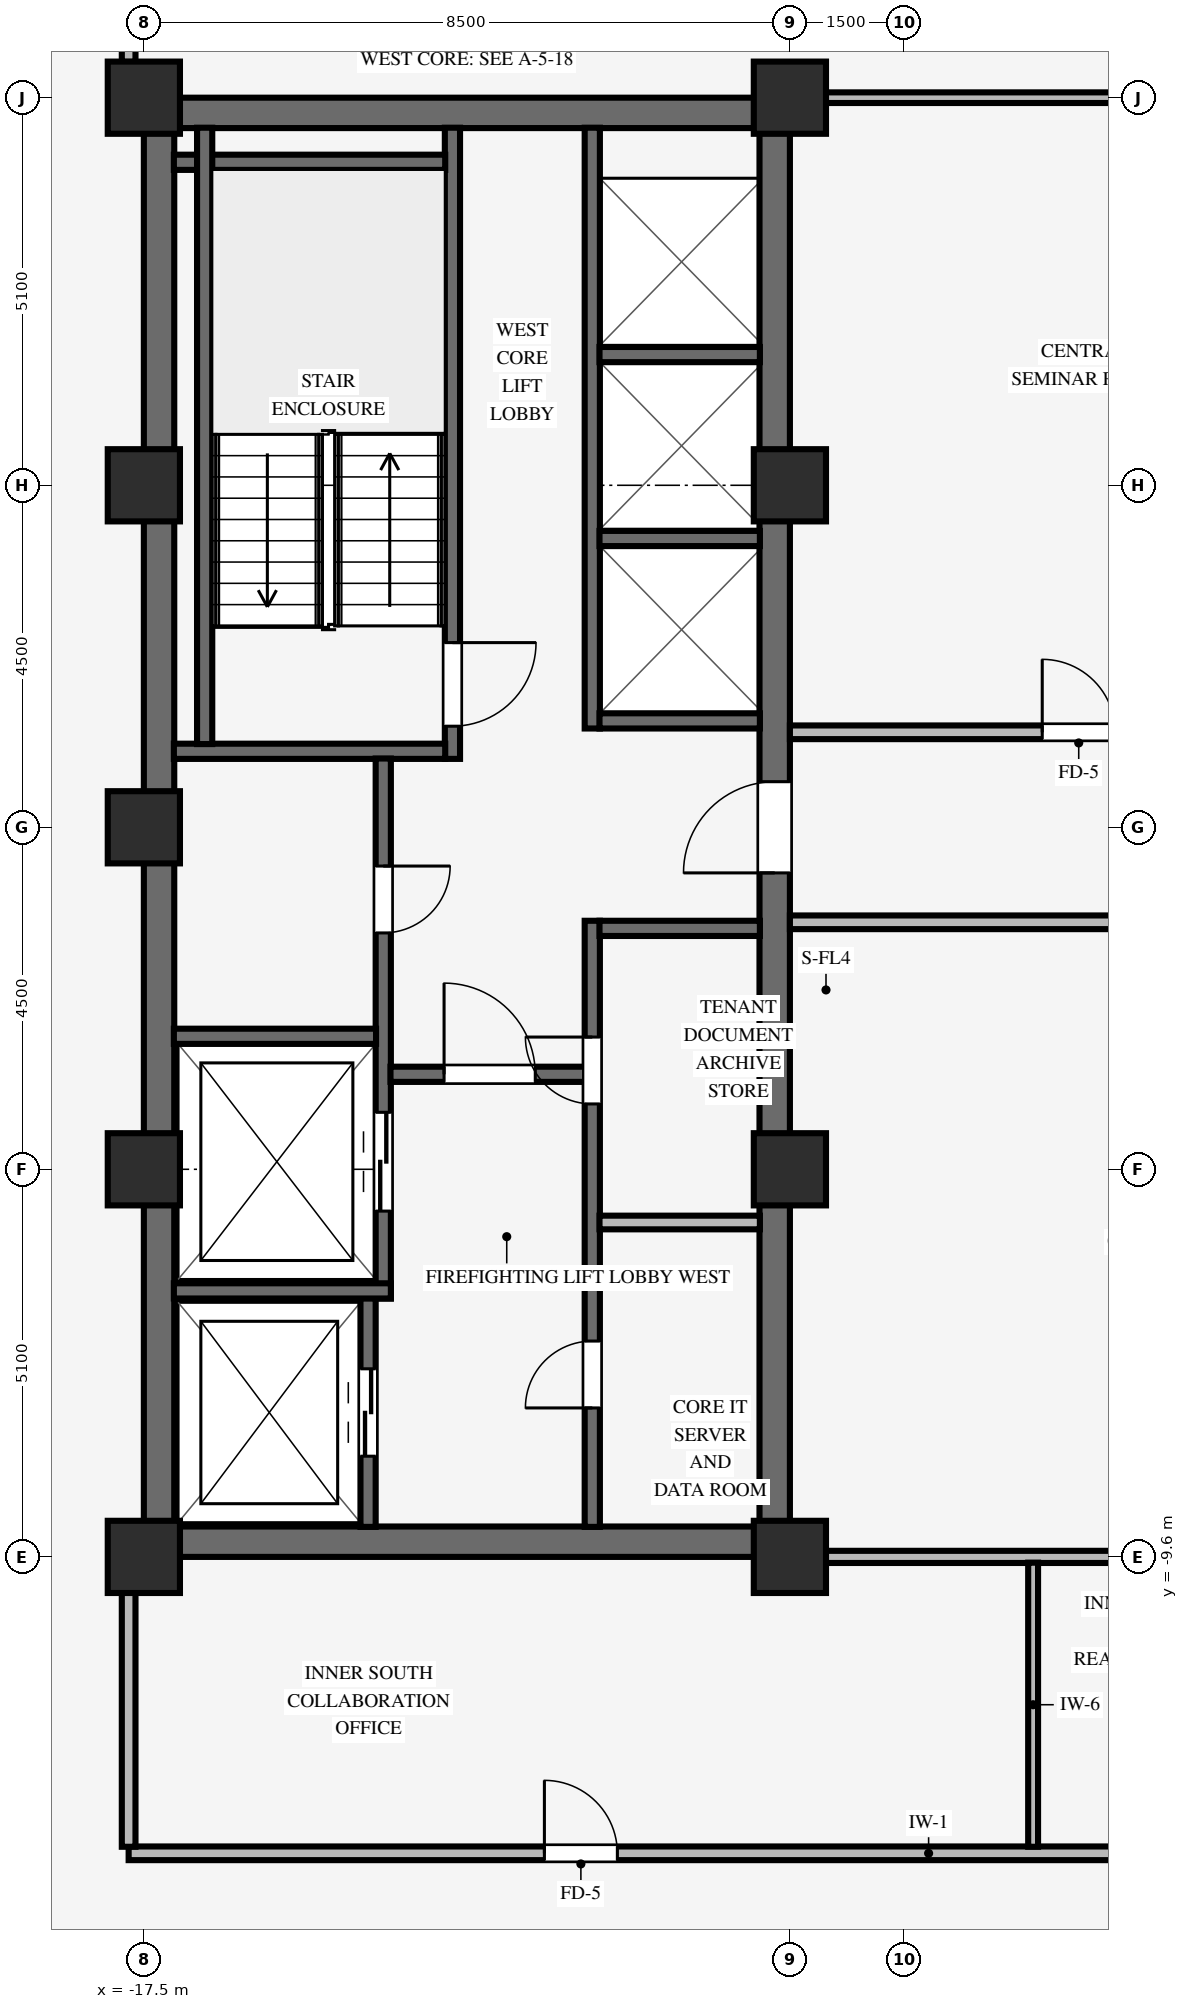
"""IFC4 building model, lengths in metres.
Left out: names, types, materials, properties, quantities, classifications, styles, units other than length and angle.
Written with IfcOpenShell. Run it as: python <this file> out.ifc"""

import sys

from ifc_helpers import new_model, si_unit, direction, frame, frame_2d, origin, origin_2d, place, context, subcontext, project, spatial, rectangle, extrude, source, transform, mapped, element, fill, save


model = new_model("IFC4")
c1 = context("Model", 3, precision=1e-05, world=origin(), true_north=direction((0.0, 1.0)))
c2 = subcontext(c1, "Body", "Model", "MODEL_VIEW")
j1 = project(units=[si_unit("LENGTHUNIT", "METRE"), si_unit("PLANEANGLEUNIT", "RADIAN")], contexts=[c1])
p1 = place(None, origin())
s1 = spatial("IfcSite", under=j1, at=p1, CompositionType="ELEMENT")
p2 = place(p1, origin())
s2 = spatial("IfcBuilding", under=s1, at=p2, CompositionType="ELEMENT")
p3 = place(p2, frame((0.0, 0.0, 182.25)))
s3 = spatial("IfcBuildingStorey", under=s2, at=p3, CompositionType="ELEMENT", Elevation=182.25)
for number, where, z_axis, x_axis in (
    (1, (-17.5, -9.4, 0.0), (0.0, 0.0, 1.0), (1.0, 0.0, 0.0)),
    (2, (-17.5, 9.4, 0.0), (0.0, 0.0, 1.0), (1.0, 0.0, 0.0)),
):
    element("IfcWall", number, at=place(p3, frame(where, z_axis=z_axis, x_axis=x_axis)), inside=s3, PredefinedType="SHEAR", context=c2, shape_type="SweptSolid", body=[
        extrude(rectangle(XDim=8.5, YDim=0.4, at=frame_2d((4.25, 0.0))), origin(), (0.0, 0.0, 1.0), 3.25),
    ])
p4 = place(p3, frame((-17.3, -9.205, 0.0), z_axis=(0.0, 0.0, 1.0), x_axis=(0.0, 1.0, 0.0)))
e3 = element("IfcWall", 3, at=p4, inside=s3, PredefinedType="SHEAR", context=c2, shape_type="SweptSolid", body=[
    extrude(rectangle(XDim=18.41, YDim=0.4, at=frame_2d((9.205, 0.0))), origin(), (0.0, 0.0, 1.0), 3.25),
])
p5 = place(p3, frame((-9.2, -9.205, 0.0), z_axis=(0.0, 0.0, 1.0), x_axis=(0.0, 1.0, 0.0)))
e4 = element("IfcWall", 4, at=p5, inside=s3, PredefinedType="SHEAR", context=c2, shape_type="SweptSolid", body=[
    extrude(rectangle(XDim=18.41, YDim=0.4, at=frame_2d((9.205, 0.0))), origin(), (0.0, 0.0, 1.0), 3.25),
])
p6 = place(p5, frame((8.605, 0.0, 0.0)))
e5 = element("IfcOpeningElement", 5, at=p6, cuts=e4, PredefinedType="OPENING", context=c2, shape_type="SweptSolid", body=[
    extrude(rectangle(XDim=1.2, YDim=2.15, at=frame_2d((0.6, 1.075))), frame((0.0, 0.21, 0.0), z_axis=(0.0, -1.0, 0.0), x_axis=(1.0, 0.0, 0.0)), (0.0, 0.0, 1.0), 0.42),
])
for number, where, z_axis, x_axis in (
    (6, (-17.5, -9.6, 0.0), (0.0, 0.0, 1.0), (1.0, 0.0, 0.0)),
    (7, (-17.5, -4.5, 0.0), (0.0, 0.0, 1.0), (1.0, 0.0, 0.0)),
    (8, (-17.5, 4.5, 0.0), (0.0, 0.0, 1.0), (1.0, 0.0, 0.0)),
    (9, (-17.5, 9.6, 0.0), (0.0, 0.0, 1.0), (1.0, 0.0, 0.0)),
    (10, (-9.0, -9.6, 0.0), (0.0, 0.0, 1.0), (1.0, 0.0, 0.0)),
    (11, (-9.0, -4.5, 0.0), (0.0, 0.0, 1.0), (1.0, 0.0, 0.0)),
    (12, (-9.0, 4.5, 0.0), (0.0, 0.0, 1.0), (1.0, 0.0, 0.0)),
    (13, (-9.0, 9.6, 0.0), (0.0, 0.0, 1.0), (1.0, 0.0, 0.0)),
    (14, (-17.5, 0.0, 0.0), (0.0, 0.0, 1.0), (1.0, 0.0, 0.0)),
):
    element("IfcColumn", number, at=place(p3, frame(where, z_axis=z_axis, x_axis=x_axis)), inside=s3, PredefinedType="COLUMN", context=c2, shape_type="SweptSolid", body=[
        extrude(rectangle(XDim=0.95, YDim=0.95, at=origin_2d()), origin(), (0.0, 0.0, 1.0), 3.25),
    ])
p7 = place(p3, frame((-13.44, 0.9, 0.0), z_axis=(0.0, 0.0, 1.0), x_axis=(0.0, 1.0, 0.0)))
e15 = element("IfcWall", 15, at=p7, inside=s3, PredefinedType="SHEAR", context=c2, shape_type="SweptSolid", body=[
    extrude(rectangle(XDim=8.305, YDim=0.2, at=frame_2d((4.153, 0.0))), origin(), (0.0, 0.0, 1.0), 3.25),
])
p8 = place(p7, frame((1.53, 0.0, 0.0), z_axis=(0.0, 0.0, 1.0), x_axis=(-1.0, 0.0, 0.0)))
e16 = element("IfcOpeningElement", 16, at=p8, cuts=e15, PredefinedType="OPENING", context=c2, shape_type="SweptSolid", body=[
    extrude(rectangle(XDim=1.1, YDim=2.15, at=frame_2d((0.55, 1.075))), frame((0.0, 0.11, 0.0), z_axis=(0.0, -1.0, 0.0), x_axis=(1.0, 0.0, 0.0)), (0.0, 0.0, 1.0), 0.22),
])
for number, where, z_axis, x_axis in (
    (17, (-17.105, 1.0, 0.0), (0.0, 0.0, 1.0), (1.0, 0.0, 0.0)),
    (18, (-17.105, 8.75, 0.0), (0.0, 0.0, 1.0), (1.0, 0.0, 0.0)),
):
    element("IfcWall", number, at=place(p3, frame(where, z_axis=z_axis, x_axis=x_axis)), inside=s3, PredefinedType="SHEAR", context=c2, shape_type="SweptSolid", body=[
        extrude(rectangle(XDim=3.57, YDim=0.2, at=frame_2d((1.785, 0.0))), origin(), (0.0, 0.0, 1.0), 3.25),
    ])
p9 = place(p3, frame((-16.7, 1.095, 0.0), z_axis=(0.0, 0.0, 1.0), x_axis=(0.0, 1.0, 0.0)))
e19 = element("IfcWall", 19, at=p9, inside=s3, PredefinedType="SHEAR", context=c2, shape_type="SweptSolid", body=[
    extrude(rectangle(XDim=8.11, YDim=0.2, at=frame_2d((4.055, 0.0))), origin(), (0.0, 0.0, 1.0), 3.25),
])
p10 = place(p3, frame((-14.55, -9.205, 0.0), z_axis=(0.0, 0.0, 1.0), x_axis=(0.0, 1.0, 0.0)))
e20 = element("IfcWall", 20, at=p10, inside=s3, PredefinedType="SHEAR", context=c2, shape_type="SweptSolid", body=[
    extrude(rectangle(XDim=3.01, YDim=0.2, at=frame_2d((1.505, 0.0))), origin(), (0.0, 0.0, 1.0), 3.25),
])
p11 = place(p10, frame((0.93, 0.0, 0.0)))
e21 = element("IfcOpeningElement", 21, at=p11, cuts=e20, PredefinedType="OPENING", context=c2, shape_type="SweptSolid", body=[
    extrude(rectangle(XDim=1.15, YDim=2.15, at=frame_2d((0.575, 1.075))), frame((0.0, 0.11, 0.0), z_axis=(0.0, -1.0, 0.0), x_axis=(1.0, 0.0, 0.0)), (0.0, 0.0, 1.0), 0.22),
])
p12 = place(p3, frame((-14.35, -6.2, 0.0), z_axis=(0.0, 0.0, 1.0), x_axis=(0.0, 1.0, 0.0)))
e22 = element("IfcWall", 22, at=p12, inside=s3, PredefinedType="SHEAR", context=c2, shape_type="SweptSolid", body=[
    extrude(rectangle(XDim=7.105, YDim=0.2, at=frame_2d((3.552, 0.0))), origin(), (0.0, 0.0, 1.0), 3.25),
])
p13 = place(p12, frame((5.69, 0.0, 0.0), z_axis=(0.0, 0.0, 1.0), x_axis=(-1.0, 0.0, 0.0)))
e23 = element("IfcOpeningElement", 23, at=p13, cuts=e22, PredefinedType="OPENING", context=c2, shape_type="SweptSolid", body=[
    extrude(rectangle(XDim=0.88, YDim=2.1, at=frame_2d((0.44, 1.05))), frame((0.0, 0.11, 0.0), z_axis=(0.0, -1.0, 0.0), x_axis=(1.0, 0.0, 0.0)), (0.0, 0.0, 1.0), 0.22),
])
p14 = place(p12, frame((1.15, 0.0, 0.0)))
e24 = element("IfcOpeningElement", 24, at=p14, cuts=e22, PredefinedType="OPENING", context=c2, shape_type="SweptSolid", body=[
    extrude(rectangle(XDim=1.3, YDim=2.2, at=frame_2d((0.65, 1.1))), frame((0.0, 0.11, 0.0), z_axis=(0.0, -1.0, 0.0), x_axis=(1.0, 0.0, 0.0)), (0.0, 0.0, 1.0), 0.22),
])
p15 = place(p3, frame((-17.105, -6.1, 0.0), z_axis=(0.0, 0.0, 1.0), x_axis=(1.0, 0.0, 0.0)))
e25 = element("IfcWall", 25, at=p15, inside=s3, PredefinedType="SHEAR", context=c2, shape_type="SweptSolid", body=[
    extrude(rectangle(XDim=2.855, YDim=0.2, at=frame_2d((1.427, 0.0))), origin(), (0.0, 0.0, 1.0), 3.25),
])
p16 = place(p3, frame((-17.105, -2.75, 0.0), z_axis=(0.0, 0.0, 1.0), x_axis=(1.0, 0.0, 0.0)))
e26 = element("IfcWall", 26, at=p16, inside=s3, PredefinedType="SHEAR", context=c2, shape_type="SweptSolid", body=[
    extrude(rectangle(XDim=2.66, YDim=0.2, at=frame_2d((1.33, 0.0))), origin(), (0.0, 0.0, 1.0), 3.25),
])
p17 = place(p3, frame((-11.6, -9.205, 0.0), z_axis=(0.0, 0.0, 1.0), x_axis=(0.0, 1.0, 0.0)))
e27 = element("IfcWall", 27, at=p17, inside=s3, PredefinedType="SHEAR", context=c2, shape_type="SweptSolid", body=[
    extrude(rectangle(XDim=7.975, YDim=0.2, at=frame_2d((3.988, 0.0))), origin(), (0.0, 0.0, 1.0), 3.25),
])
p18 = place(p17, frame((1.565, 0.0, 0.0)))
e28 = element("IfcOpeningElement", 28, at=p18, cuts=e27, PredefinedType="OPENING", context=c2, shape_type="SweptSolid", body=[
    extrude(rectangle(XDim=0.88, YDim=2.1, at=frame_2d((0.44, 1.05))), frame((0.0, 0.11, 0.0), z_axis=(0.0, -1.0, 0.0), x_axis=(1.0, 0.0, 0.0)), (0.0, 0.0, 1.0), 0.22),
])
p19 = place(p17, frame((5.565, 0.0, 0.0)))
e29 = element("IfcOpeningElement", 29, at=p19, cuts=e27, PredefinedType="OPENING", context=c2, shape_type="SweptSolid", body=[
    extrude(rectangle(XDim=0.88, YDim=2.1, at=frame_2d((0.44, 1.05))), frame((0.0, 0.11, 0.0), z_axis=(0.0, -1.0, 0.0), x_axis=(1.0, 0.0, 0.0)), (0.0, 0.0, 1.0), 0.22),
])
p20 = place(p3, frame((-14.255, -3.25, 0.0), z_axis=(0.0, 0.0, 1.0), x_axis=(1.0, 0.0, 0.0)))
e30 = element("IfcWall", 30, at=p20, inside=s3, PredefinedType="SHEAR", context=c2, shape_type="SweptSolid", body=[
    extrude(rectangle(XDim=2.56, YDim=0.2, at=frame_2d((1.28, 0.0))), origin(), (0.0, 0.0, 1.0), 3.25),
])
p21 = place(p20, frame((0.705, 0.0, 0.0)))
e31 = element("IfcOpeningElement", 31, at=p21, cuts=e30, PredefinedType="OPENING", context=c2, shape_type="SweptSolid", body=[
    extrude(rectangle(XDim=1.2, YDim=2.15, at=frame_2d((0.6, 1.075))), frame((0.0, 0.11, 0.0), z_axis=(0.0, -1.0, 0.0), x_axis=(1.0, 0.0, 0.0)), (0.0, 0.0, 1.0), 0.22),
])
p22 = place(p3, frame((-11.505, -1.33, 0.0), z_axis=(0.0, 0.0, 1.0), x_axis=(1.0, 0.0, 0.0)))
e32 = element("IfcWall", 32, at=p22, inside=s3, PredefinedType="SHEAR", context=c2, shape_type="SweptSolid", body=[
    extrude(rectangle(XDim=2.11, YDim=0.2, at=frame_2d((1.055, 0.0))), origin(), (0.0, 0.0, 1.0), 3.25),
])
p23 = place(p3, frame((-11.505, -5.2, 0.0), z_axis=(0.0, 0.0, 1.0), x_axis=(1.0, 0.0, 0.0)))
e33 = element("IfcWall", 33, at=p23, inside=s3, PredefinedType="PARTITIONING", context=c2, shape_type="SweptSolid", body=[
    extrude(rectangle(XDim=2.11, YDim=0.18, at=frame_2d((1.055, 0.0))), origin(), (0.0, 0.0, 1.0), 3.24),
])
p24 = place(p3, frame((-11.6, 1.3, 0.0), z_axis=(0.0, 0.0, 1.0), x_axis=(0.0, 1.0, 0.0)))
e34 = element("IfcWall", 34, at=p24, inside=s3, PredefinedType="SHEAR", context=c2, shape_type="SweptSolid", body=[
    extrude(rectangle(XDim=7.905, YDim=0.2, at=frame_2d((3.953, 0.0))), origin(), (0.0, 0.0, 1.0), 3.25),
])
for number, where, z_axis, x_axis in (
    (35, (-11.505, 1.4, 0.0), (0.0, 0.0, 1.0), (1.0, 0.0, 0.0)),
    (36, (-11.505, 3.8, 0.0), (0.0, 0.0, 1.0), (1.0, 0.0, 0.0)),
    (37, (-11.505, 6.22, 0.0), (0.0, 0.0, 1.0), (1.0, 0.0, 0.0)),
):
    element("IfcWall", number, at=place(p3, frame(where, z_axis=z_axis, x_axis=x_axis)), inside=s3, PredefinedType="SHEAR", context=c2, shape_type="SweptSolid", body=[
        extrude(rectangle(XDim=2.11, YDim=0.2, at=frame_2d((1.055, 0.0))), origin(), (0.0, 0.0, 1.0), 3.25),
    ])
p25 = place(p3, frame((-17.7, -13.5, 0.0), z_axis=(0.0, 0.0, 1.0), x_axis=(1.0, 0.0, 0.0)))
e38 = element("IfcWall", 38, at=p25, inside=s3, PredefinedType="PARTITIONING", context=c2, shape_type="SweptSolid", body=[
    extrude(rectangle(XDim=24.3, YDim=0.18, at=frame_2d((12.15, 0.0))), origin(), (0.0, 0.0, 1.0), 2.888),
])
p26 = place(p25, frame((5.47, 0.0, 0.0)))
e39 = element("IfcOpeningElement", 39, at=p26, cuts=e38, PredefinedType="OPENING", context=c2, shape_type="SweptSolid", body=[
    extrude(rectangle(XDim=0.96, YDim=2.1, at=frame_2d((0.48, 1.05))), frame((0.0, 0.1, 0.0), z_axis=(0.0, -1.0, 0.0), x_axis=(1.0, 0.0, 0.0)), (0.0, 0.0, 1.0), 0.2),
])
p27 = place(p25, frame((14.62, 0.0, 0.0)))
e40 = element("IfcOpeningElement", 40, at=p27, cuts=e38, PredefinedType="OPENING", context=c2, shape_type="SweptSolid", body=[
    extrude(rectangle(XDim=0.96, YDim=2.1, at=frame_2d((0.48, 1.05))), frame((0.0, 0.1, 0.0), z_axis=(0.0, -1.0, 0.0), x_axis=(1.0, 0.0, 0.0)), (0.0, 0.0, 1.0), 0.2),
])
p28 = place(p25, frame((18.9, 0.0, 0.0)))
e41 = element("IfcOpeningElement", 41, at=p28, cuts=e38, PredefinedType="OPENING", context=c2, shape_type="SweptSolid", body=[
    extrude(rectangle(XDim=0.9, YDim=2.1, at=frame_2d((0.45, 1.05))), frame((0.0, 0.1, 0.0), z_axis=(0.0, -1.0, 0.0), x_axis=(1.0, 0.0, 0.0)), (0.0, 0.0, 1.0), 0.2),
])
p29 = place(p25, frame((21.0, 0.0, 0.0)))
e42 = element("IfcOpeningElement", 42, at=p29, cuts=e38, PredefinedType="OPENING", context=c2, shape_type="SweptSolid", body=[
    extrude(rectangle(XDim=0.9, YDim=2.1, at=frame_2d((0.45, 1.05))), frame((0.0, 0.1, 0.0), z_axis=(0.0, -1.0, 0.0), x_axis=(1.0, 0.0, 0.0)), (0.0, 0.0, 1.0), 0.2),
])
p30 = place(p3, frame((-8.529, -9.6, 0.0), z_axis=(0.0, 0.0, 1.0), x_axis=(1.0, 0.0, 0.0)))
e43 = element("IfcWall", 43, at=p30, inside=s3, PredefinedType="PARTITIONING", context=c2, shape_type="SweptSolid", body=[
    extrude(rectangle(XDim=8.378, YDim=0.16, at=frame_2d((4.189, 0.0))), origin(), (0.0, 0.0, 1.0), 2.285),
])
p31 = place(p3, frame((-9.0, -1.25, 0.0), z_axis=(0.0, 0.0, 1.0), x_axis=(1.0, 0.0, 0.0)))
e44 = element("IfcWall", 44, at=p31, inside=s3, PredefinedType="PARTITIONING", context=c2, shape_type="SweptSolid", body=[
    extrude(rectangle(XDim=15.6, YDim=0.18, at=frame_2d((7.8, 0.0))), origin(), (0.0, 0.0, 1.0), 3.24),
])
p32 = place(p31, frame((7.32, 0.0, 0.0)))
e45 = element("IfcOpeningElement", 45, at=p32, cuts=e44, PredefinedType="OPENING", context=c2, shape_type="SweptSolid", body=[
    extrude(rectangle(XDim=0.96, YDim=2.1, at=frame_2d((0.48, 1.05))), frame((0.0, 0.1, 0.0), z_axis=(0.0, -1.0, 0.0), x_axis=(1.0, 0.0, 0.0)), (0.0, 0.0, 1.0), 0.2),
])
p33 = place(p3, frame((-9.0, 1.25, 0.0), z_axis=(0.0, 0.0, 1.0), x_axis=(1.0, 0.0, 0.0)))
e46 = element("IfcWall", 46, at=p33, inside=s3, PredefinedType="PARTITIONING", context=c2, shape_type="SweptSolid", body=[
    extrude(rectangle(XDim=15.6, YDim=0.18, at=frame_2d((7.8, 0.0))), origin(), (0.0, 0.0, 1.0), 3.24),
])
p34 = place(p33, frame((3.32, 0.0, 0.0)))
e47 = element("IfcOpeningElement", 47, at=p34, cuts=e46, PredefinedType="OPENING", context=c2, shape_type="SweptSolid", body=[
    extrude(rectangle(XDim=0.96, YDim=2.1, at=frame_2d((0.48, 1.05))), frame((0.0, 0.1, 0.0), z_axis=(0.0, -1.0, 0.0), x_axis=(1.0, 0.0, 0.0)), (0.0, 0.0, 1.0), 0.2),
])
p35 = place(p3, frame((-8.529, 9.6, 0.0), z_axis=(0.0, 0.0, 1.0), x_axis=(1.0, 0.0, 0.0)))
e48 = element("IfcWall", 48, at=p35, inside=s3, PredefinedType="PARTITIONING", context=c2, shape_type="SweptSolid", body=[
    extrude(rectangle(XDim=8.378, YDim=0.14, at=frame_2d((4.189, 0.0))), origin(), (0.0, 0.0, 1.0), 2.285),
])
for number, where, z_axis, x_axis in (
    (49, (-17.7, -13.414, 0.0), (0.0, 0.0, 1.0), (0.0, 1.0, 0.0)),
    (50, (-17.7, 10.071, 0.0), (0.0, 0.0, 1.0), (0.0, 1.0, 0.0)),
):
    element("IfcWall", number, at=place(p3, frame(where, z_axis=z_axis, x_axis=x_axis)), inside=s3, PredefinedType="PARTITIONING", context=c2, shape_type="SweptSolid", body=[
        extrude(rectangle(XDim=3.343, YDim=0.18, at=frame_2d((1.671, 0.0))), origin(), (0.0, 0.0, 1.0), 2.335),
    ])
p36 = place(p3, frame((-5.8, -13.414, 0.0), z_axis=(0.0, 0.0, 1.0), x_axis=(0.0, 1.0, 0.0)))
e51 = element("IfcWall", 51, at=p36, inside=s3, PredefinedType="PARTITIONING", context=c2, shape_type="SweptSolid", body=[
    extrude(rectangle(XDim=3.738, YDim=0.13, at=frame_2d((1.869, 0.0))), origin(), (0.0, 0.0, 1.0), 3.24),
])
m1 = source(origin(), c2, "Body", "SweptSolid", [
    extrude(rectangle(XDim=1.1, YDim=2.15, at=frame_2d((0.55, 1.075))), frame((0.0, 0.025, 0.0), z_axis=(0.0, -1.0, 0.0), x_axis=(1.0, 0.0, 0.0)), (0.0, 0.0, 1.0), 0.05),
])
p37 = place(p8, origin())
e52 = element("IfcDoor", 52, at=p37, inside=s3, OperationType="SINGLE_SWING_LEFT", PredefinedType="DOOR", context=c2, shape_type="MappedRepresentation", body=[
    mapped(m1, transform((0.0, 0.0, 0.0), scale=1.0)),
])
fill(e16, e52)
m2 = source(origin(), c2, "Body", "SweptSolid", [
    extrude(rectangle(XDim=0.88, YDim=2.1, at=frame_2d((0.44, 1.05))), frame((0.0, 0.025, 0.0), z_axis=(0.0, -1.0, 0.0), x_axis=(1.0, 0.0, 0.0)), (0.0, 0.0, 1.0), 0.05),
])
p38 = place(p13, origin())
e53 = element("IfcDoor", 53, at=p38, inside=s3, OperationType="SINGLE_SWING_LEFT", PredefinedType="DOOR", context=c2, shape_type="MappedRepresentation", body=[
    mapped(m2, transform((0.0, 0.0, 0.0), scale=1.0)),
])
fill(e23, e53)
m3 = source(origin(), c2, "Body", "SweptSolid", [
    extrude(rectangle(XDim=1.2, YDim=2.15, at=frame_2d((0.6, 1.075))), frame((0.0, 0.025, 0.0), z_axis=(0.0, -1.0, 0.0), x_axis=(1.0, 0.0, 0.0)), (0.0, 0.0, 1.0), 0.05),
])
p39 = place(p21, origin())
e54 = element("IfcDoor", 54, at=p39, inside=s3, OperationType="SINGLE_SWING_LEFT", PredefinedType="DOOR", context=c2, shape_type="MappedRepresentation", body=[
    mapped(m3, transform((0.0, 0.0, 0.0), scale=1.0)),
])
fill(e31, e54)
p40 = place(p18, origin())
e55 = element("IfcDoor", 55, at=p40, inside=s3, OperationType="SINGLE_SWING_LEFT", PredefinedType="DOOR", context=c2, shape_type="MappedRepresentation", body=[
    mapped(m2, transform((0.0, 0.0, 0.0), scale=1.0)),
])
fill(e28, e55)
p41 = place(p19, origin())
e56 = element("IfcDoor", 56, at=p41, inside=s3, OperationType="SINGLE_SWING_RIGHT", PredefinedType="DOOR", context=c2, shape_type="MappedRepresentation", body=[
    mapped(m2, transform((0.0, 0.0, 0.0), scale=1.0)),
])
fill(e29, e56)
p42 = place(p6, origin())
e57 = element("IfcDoor", 57, at=p42, inside=s3, OperationType="SINGLE_SWING_LEFT", PredefinedType="DOOR", context=c2, shape_type="MappedRepresentation", body=[
    mapped(m3, transform((0.0, 0.0, 0.0), scale=1.0)),
])
fill(e5, e57)
m4 = source(origin(), c2, "Body", "SweptSolid", [
    extrude(rectangle(XDim=1.15, YDim=2.15, at=frame_2d((0.575, 1.075))), frame((0.0, 0.025, 0.0), z_axis=(0.0, -1.0, 0.0), x_axis=(1.0, 0.0, 0.0)), (0.0, 0.0, 1.0), 0.05),
])
p43 = place(p11, origin())
e58 = element("IfcDoor", 58, at=p43, inside=s3, OperationType="DOUBLE_DOOR_SLIDING", PredefinedType="DOOR", context=c2, shape_type="MappedRepresentation", body=[
    mapped(m4, transform((0.0, 0.0, 0.0), scale=1.0)),
])
fill(e21, e58)
m5 = source(origin(), c2, "Body", "SweptSolid", [
    extrude(rectangle(XDim=1.3, YDim=2.2, at=frame_2d((0.65, 1.1))), frame((0.0, 0.025, 0.0), z_axis=(0.0, -1.0, 0.0), x_axis=(1.0, 0.0, 0.0)), (0.0, 0.0, 1.0), 0.05),
])
p44 = place(p14, origin())
e59 = element("IfcDoor", 59, at=p44, inside=s3, OperationType="DOUBLE_DOOR_SLIDING", PredefinedType="DOOR", context=c2, shape_type="MappedRepresentation", body=[
    mapped(m5, transform((0.0, 0.0, 0.0), scale=1.0)),
])
fill(e24, e59)
m6 = source(origin(), c2, "Body", "SweptSolid", [
    extrude(rectangle(XDim=0.96, YDim=2.1, at=frame_2d((0.48, 1.05))), frame((0.0, 0.025, 0.0), z_axis=(0.0, -1.0, 0.0), x_axis=(1.0, 0.0, 0.0)), (0.0, 0.0, 1.0), 0.05),
])
p45 = place(p26, origin())
e60 = element("IfcDoor", 60, at=p45, inside=s3, OperationType="SINGLE_SWING_LEFT", PredefinedType="DOOR", context=c2, shape_type="MappedRepresentation", body=[
    mapped(m6, transform((0.0, 0.0, 0.0), scale=1.0)),
])
fill(e39, e60)
p46 = place(p34, origin())
e61 = element("IfcDoor", 61, at=p46, inside=s3, OperationType="SINGLE_SWING_LEFT", PredefinedType="DOOR", context=c2, shape_type="MappedRepresentation", body=[
    mapped(m6, transform((0.0, 0.0, 0.0), scale=1.0)),
])
fill(e47, e61)
save(model, sys.argv[1])
